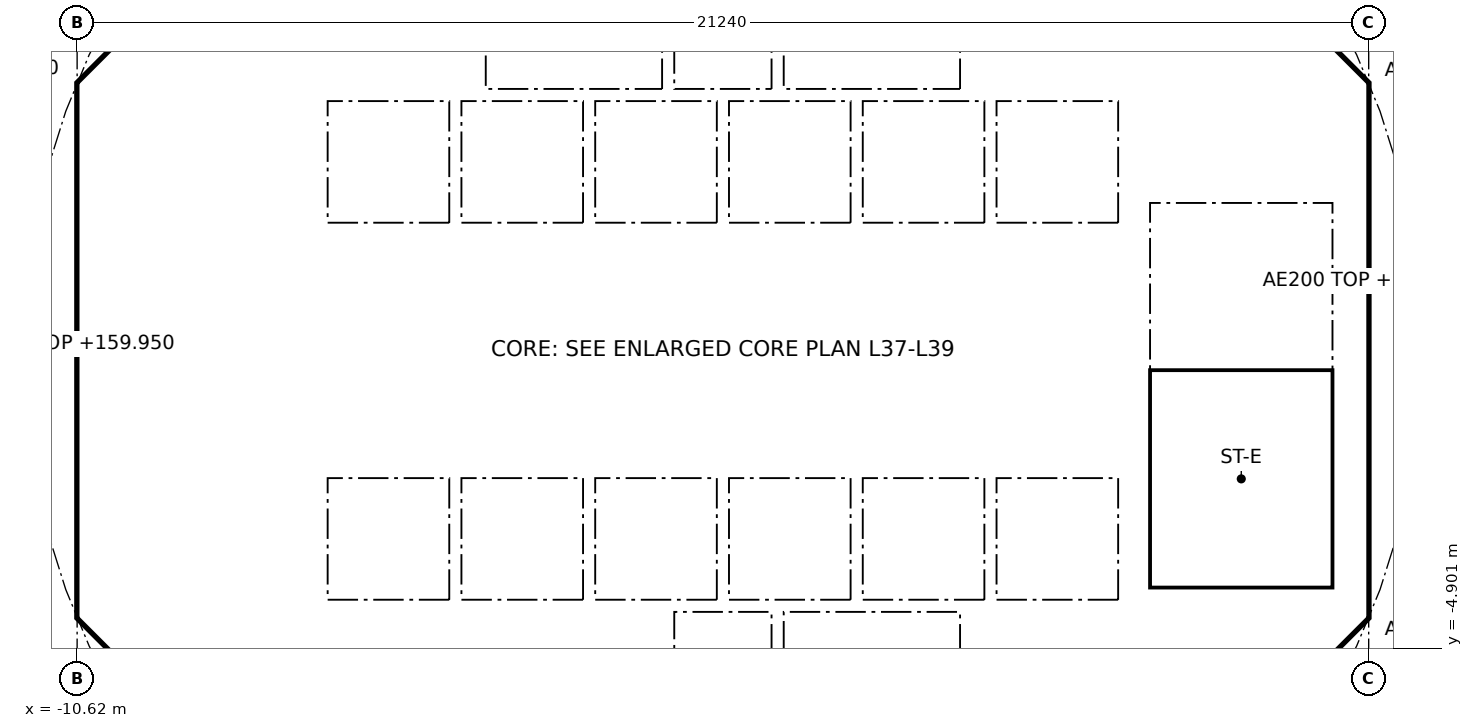
"""IFC4 building model, lengths in metres.
Left out: names, types, materials, properties, quantities, classifications, styles, units other than length and angle.
Written with IfcOpenShell. Run it as: python <this file> out.ifc"""

import sys

from ifc_helpers import new_model, si_unit, direction, frame, frame_2d, origin, place, context, subcontext, project, spatial, polyline, rectangle, outline, extrude, element, fill, save


model = new_model("IFC4")
c1 = context("Model", 3, precision=1e-05, world=origin(), true_north=direction((0.0, 1.0)))
c2 = subcontext(c1, "Body", "Model", "MODEL_VIEW")
j1 = project(units=[si_unit("LENGTHUNIT", "METRE"), si_unit("PLANEANGLEUNIT", "RADIAN")], contexts=[c1])
p1 = place(None, origin())
s1 = spatial("IfcSite", under=j1, at=p1, CompositionType="ELEMENT")
p2 = place(p1, origin())
s2 = spatial("IfcBuilding", under=s1, at=p2, CompositionType="ELEMENT")
p3 = place(p2, frame((0.0, 0.0, 156.6)))
s3 = spatial("IfcBuildingStorey", under=s2, at=p3, CompositionType="ELEMENT", Elevation=156.6)
p4 = place(p3, frame((9.988, 4.613, 0.0), z_axis=(0.0, 0.0, 1.0), x_axis=(-0.707106781187, 0.707106781187, 0.0)))
e1 = element("IfcWall", 1, at=p4, inside=s3, PredefinedType="SHEAR", context=c2, shape_type="SweptSolid", body=[
    extrude(rectangle(XDim=7.602, YDim=0.6, at=frame_2d((3.801, 0.0))), origin(), (0.0, 0.0, 1.0), 3.35),
])
p5 = place(p4, frame((3.201, 0.0, 0.0)))
e2 = element("IfcOpeningElement", 2, at=p5, cuts=e1, PredefinedType="OPENING", context=c2, shape_type="SweptSolid", body=[
    extrude(rectangle(XDim=1.2, YDim=2.1, at=frame_2d((0.6, 1.05))), frame((0.0, 0.31, 0.0), z_axis=(0.0, -1.0, 0.0), x_axis=(1.0, 0.0, 0.0)), (0.0, 0.0, 1.0), 0.62),
])
p6 = place(p3, frame((-4.613, 9.988, 0.0), z_axis=(0.0, 0.0, 1.0), x_axis=(-0.707106781187, -0.707106781187, 0.0)))
e3 = element("IfcWall", 3, at=p6, inside=s3, PredefinedType="SHEAR", context=c2, shape_type="SweptSolid", body=[
    extrude(rectangle(XDim=7.602, YDim=0.6, at=frame_2d((3.801, 0.0))), origin(), (0.0, 0.0, 1.0), 3.35),
])
p7 = place(p6, frame((0.351, 0.0, 0.0)))
e4 = element("IfcOpeningElement", 4, at=p7, cuts=e3, PredefinedType="OPENING", context=c2, shape_type="SweptSolid", body=[
    extrude(rectangle(XDim=1.1, YDim=2.1, at=frame_2d((0.55, 1.05))), frame((0.0, 0.31, 0.0), z_axis=(0.0, -1.0, 0.0), x_axis=(1.0, 0.0, 0.0)), (0.0, 0.0, 1.0), 0.62),
])
p8 = place(p3, frame((-10.325, 3.801, 0.0), z_axis=(0.0, 0.0, 1.0), x_axis=(0.0, -1.0, 0.0)))
e5 = element("IfcWall", 5, at=p8, inside=s3, PredefinedType="SHEAR", context=c2, shape_type="SweptSolid", body=[
    extrude(rectangle(XDim=7.602, YDim=0.6, at=frame_2d((3.801, 0.0))), origin(), (0.0, 0.0, 1.0), 3.35),
])
p9 = place(p8, frame((0.651, 0.0, 0.0)))
e6 = element("IfcOpeningElement", 6, at=p9, cuts=e5, PredefinedType="OPENING", context=c2, shape_type="SweptSolid", body=[
    extrude(rectangle(XDim=1.5, YDim=2.1, at=frame_2d((0.75, 1.05))), frame((0.0, 0.31, 0.0), z_axis=(0.0, -1.0, 0.0), x_axis=(1.0, 0.0, 0.0)), (0.0, 0.0, 1.0), 0.62),
])
p10 = place(p8, frame((5.451, 0.0, 0.0)))
e7 = element("IfcOpeningElement", 7, at=p10, cuts=e5, PredefinedType="OPENING", context=c2, shape_type="SweptSolid", body=[
    extrude(rectangle(XDim=1.5, YDim=2.1, at=frame_2d((0.75, 1.05))), frame((0.0, 0.31, 0.0), z_axis=(0.0, -1.0, 0.0), x_axis=(1.0, 0.0, 0.0)), (0.0, 0.0, 1.0), 0.62),
])
p11 = place(p3, frame((-9.988, -4.613, 0.0), z_axis=(0.0, 0.0, 1.0), x_axis=(0.707106781187, -0.707106781187, 0.0)))
e8 = element("IfcWall", 8, at=p11, inside=s3, PredefinedType="SHEAR", context=c2, shape_type="SweptSolid", body=[
    extrude(rectangle(XDim=7.602, YDim=0.6, at=frame_2d((3.801, 0.0))), origin(), (0.0, 0.0, 1.0), 3.35),
])
p12 = place(p11, frame((6.151, 0.0, 0.0)))
e9 = element("IfcOpeningElement", 9, at=p12, cuts=e8, PredefinedType="OPENING", context=c2, shape_type="SweptSolid", body=[
    extrude(rectangle(XDim=1.1, YDim=2.1, at=frame_2d((0.55, 1.05))), frame((0.0, 0.31, 0.0), z_axis=(0.0, -1.0, 0.0), x_axis=(1.0, 0.0, 0.0)), (0.0, 0.0, 1.0), 0.62),
])
p13 = place(p3, frame((4.613, -9.988, 0.0), z_axis=(0.0, 0.0, 1.0), x_axis=(0.707106781187, 0.707106781187, 0.0)))
e10 = element("IfcWall", 10, at=p13, inside=s3, PredefinedType="SHEAR", context=c2, shape_type="SweptSolid", body=[
    extrude(rectangle(XDim=7.602, YDim=0.6, at=frame_2d((3.801, 0.0))), origin(), (0.0, 0.0, 1.0), 3.35),
])
p14 = place(p13, frame((3.201, 0.0, 0.0)))
e11 = element("IfcOpeningElement", 11, at=p14, cuts=e10, PredefinedType="OPENING", context=c2, shape_type="SweptSolid", body=[
    extrude(rectangle(XDim=1.2, YDim=2.1, at=frame_2d((0.6, 1.05))), frame((0.0, 0.31, 0.0), z_axis=(0.0, -1.0, 0.0), x_axis=(1.0, 0.0, 0.0)), (0.0, 0.0, 1.0), 0.62),
])
p15 = place(p3, frame((-5.8, 4.3, 0.0), z_axis=(0.0, 0.0, 1.0), x_axis=(0.0, 1.0, 0.0)))
e12 = element("IfcWall", 12, at=p15, inside=s3, PredefinedType="PARTITIONING", context=c2, shape_type="SweptSolid", body=[
    extrude(rectangle(XDim=3.927, YDim=0.15, at=frame_2d((1.963, 0.0))), origin(), (0.0, 0.0, 1.0), 3.35),
])
p16 = place(p15, frame((1.551, 0.0, 0.0)))
e13 = element("IfcOpeningElement", 13, at=p16, cuts=e12, PredefinedType="OPENING", context=c2, shape_type="SweptSolid", body=[
    extrude(rectangle(XDim=0.9, YDim=2.1, at=frame_2d((0.45, 1.05))), frame((0.0, 0.085, 0.0), z_axis=(0.0, -1.0, 0.0), x_axis=(1.0, 0.0, 0.0)), (0.0, 0.0, 1.0), 0.17),
])
p17 = place(p3, frame((4.0, 4.3, 0.0), z_axis=(0.0, 0.0, 1.0), x_axis=(0.0, 1.0, 0.0)))
e14 = element("IfcWall", 14, at=p17, inside=s3, PredefinedType="SOLIDWALL", context=c2, shape_type="SweptSolid", body=[
    extrude(rectangle(XDim=2.2, YDim=0.2, at=frame_2d((1.1, 0.0))), origin(), (0.0, 0.0, 1.0), 3.35),
])
p18 = place(p17, frame((0.55, 0.0, 0.0)))
e15 = element("IfcOpeningElement", 15, at=p18, cuts=e14, PredefinedType="OPENING", context=c2, shape_type="SweptSolid", body=[
    extrude(rectangle(XDim=1.1, YDim=2.1, at=frame_2d((0.55, 1.05))), frame((0.0, 0.11, 0.0), z_axis=(0.0, -1.0, 0.0), x_axis=(1.0, 0.0, 0.0)), (0.0, 0.0, 1.0), 0.22),
])
p19 = place(p3, frame((-4.0, 4.3, 0.0), z_axis=(0.0, 0.0, 1.0), x_axis=(0.0, 1.0, 0.0)))
e16 = element("IfcWall", 16, at=p19, inside=s3, PredefinedType="SOLIDWALL", context=c2, shape_type="SweptSolid", body=[
    extrude(rectangle(XDim=2.2, YDim=0.2, at=frame_2d((1.1, 0.0))), origin(), (0.0, 0.0, 1.0), 3.35),
])
p20 = place(p19, frame((0.55, 0.0, 0.0)))
e17 = element("IfcOpeningElement", 17, at=p20, cuts=e16, PredefinedType="OPENING", context=c2, shape_type="SweptSolid", body=[
    extrude(rectangle(XDim=1.1, YDim=2.1, at=frame_2d((0.55, 1.05))), frame((0.0, 0.11, 0.0), z_axis=(0.0, -1.0, 0.0), x_axis=(1.0, 0.0, 0.0)), (0.0, 0.0, 1.0), 0.22),
])
p21 = place(p3, frame((-6.7, 2.0, 0.0), z_axis=(0.0, 0.0, 1.0), x_axis=(1.0, 0.0, 0.0)))
e18 = element("IfcWall", 18, at=p21, inside=s3, PredefinedType="SOLIDWALL", context=c2, shape_type="SweptSolid", body=[
    extrude(rectangle(XDim=13.4, YDim=0.2, at=frame_2d((6.7, 0.0))), origin(), (0.0, 0.0, 1.0), 3.35),
])
p22 = place(p21, frame((0.65, 0.0, 0.0)))
e19 = element("IfcOpeningElement", 19, at=p22, cuts=e18, PredefinedType="OPENING", context=c2, shape_type="SweptSolid", body=[
    extrude(rectangle(XDim=1.1, YDim=2.1, at=frame_2d((0.55, 1.05))), frame((0.0, 0.11, 0.0), z_axis=(0.0, -1.0, 0.0), x_axis=(1.0, 0.0, 0.0)), (0.0, 0.0, 1.0), 0.22),
])
p23 = place(p21, frame((2.85, 0.0, 0.0)))
e20 = element("IfcOpeningElement", 20, at=p23, cuts=e18, PredefinedType="OPENING", context=c2, shape_type="SweptSolid", body=[
    extrude(rectangle(XDim=1.1, YDim=2.1, at=frame_2d((0.55, 1.05))), frame((0.0, 0.11, 0.0), z_axis=(0.0, -1.0, 0.0), x_axis=(1.0, 0.0, 0.0)), (0.0, 0.0, 1.0), 0.22),
])
p24 = place(p21, frame((5.05, 0.0, 0.0)))
e21 = element("IfcOpeningElement", 21, at=p24, cuts=e18, PredefinedType="OPENING", context=c2, shape_type="SweptSolid", body=[
    extrude(rectangle(XDim=1.1, YDim=2.1, at=frame_2d((0.55, 1.05))), frame((0.0, 0.11, 0.0), z_axis=(0.0, -1.0, 0.0), x_axis=(1.0, 0.0, 0.0)), (0.0, 0.0, 1.0), 0.22),
])
p25 = place(p3, frame((6.7, 4.0, 0.0), z_axis=(0.0, 0.0, 1.0), x_axis=(1.0, 0.0, 0.0)))
e22 = element("IfcWall", 22, at=p25, inside=s3, PredefinedType="SOLIDWALL", context=c2, shape_type="SweptSolid", body=[
    extrude(rectangle(XDim=3.325, YDim=0.2, at=frame_2d((1.662, 0.0))), origin(), (0.0, 0.0, 1.0), 3.35),
])
p26 = place(p25, frame((1.25, 0.0, 0.0)))
e23 = element("IfcOpeningElement", 23, at=p26, cuts=e22, PredefinedType="OPENING", context=c2, shape_type="SweptSolid", body=[
    extrude(rectangle(XDim=1.1, YDim=2.1, at=frame_2d((0.55, 1.05))), frame((0.0, 0.11, 0.0), z_axis=(0.0, -1.0, 0.0), x_axis=(1.0, 0.0, 0.0)), (0.0, 0.0, 1.0), 0.22),
])
p27 = place(p3, frame((-7.4, -6.627, 0.0), z_axis=(0.0, 0.0, 1.0), x_axis=(0.0, 1.0, 0.0)))
e24 = element("IfcWall", 24, at=p27, inside=s3, PredefinedType="PARTITIONING", context=c2, shape_type="SweptSolid", body=[
    extrude(rectangle(XDim=2.527, YDim=0.15, at=frame_2d((1.263, 0.0))), origin(), (0.0, 0.0, 1.0), 3.35),
])
p28 = place(p27, frame((0.776, 0.0, 0.0)))
e25 = element("IfcOpeningElement", 25, at=p28, cuts=e24, PredefinedType="OPENING", context=c2, shape_type="SweptSolid", body=[
    extrude(rectangle(XDim=0.9, YDim=2.1, at=frame_2d((0.45, 1.05))), frame((0.0, 0.085, 0.0), z_axis=(0.0, -1.0, 0.0), x_axis=(1.0, 0.0, 0.0)), (0.0, 0.0, 1.0), 0.17),
])
p29 = place(p3, frame((4.0, -6.5, 0.0), z_axis=(0.0, 0.0, 1.0), x_axis=(0.0, 1.0, 0.0)))
e26 = element("IfcWall", 26, at=p29, inside=s3, PredefinedType="SOLIDWALL", context=c2, shape_type="SweptSolid", body=[
    extrude(rectangle(XDim=2.2, YDim=0.2, at=frame_2d((1.1, 0.0))), origin(), (0.0, 0.0, 1.0), 3.35),
])
p30 = place(p29, frame((0.55, 0.0, 0.0)))
e27 = element("IfcOpeningElement", 27, at=p30, cuts=e26, PredefinedType="OPENING", context=c2, shape_type="SweptSolid", body=[
    extrude(rectangle(XDim=1.1, YDim=2.1, at=frame_2d((0.55, 1.05))), frame((0.0, 0.11, 0.0), z_axis=(0.0, -1.0, 0.0), x_axis=(1.0, 0.0, 0.0)), (0.0, 0.0, 1.0), 0.22),
])
p31 = place(p3, frame((-4.0, -6.5, 0.0), z_axis=(0.0, 0.0, 1.0), x_axis=(0.0, 1.0, 0.0)))
e28 = element("IfcWall", 28, at=p31, inside=s3, PredefinedType="SOLIDWALL", context=c2, shape_type="SweptSolid", body=[
    extrude(rectangle(XDim=2.2, YDim=0.2, at=frame_2d((1.1, 0.0))), origin(), (0.0, 0.0, 1.0), 3.35),
])
p32 = place(p31, frame((0.65, 0.0, 0.0)))
e29 = element("IfcOpeningElement", 29, at=p32, cuts=e28, PredefinedType="OPENING", context=c2, shape_type="SweptSolid", body=[
    extrude(rectangle(XDim=0.9, YDim=2.1, at=frame_2d((0.45, 1.05))), frame((0.0, 0.11, 0.0), z_axis=(0.0, -1.0, 0.0), x_axis=(1.0, 0.0, 0.0)), (0.0, 0.0, 1.0), 0.22),
])
p33 = place(p3, frame((-6.7, -2.0, 0.0), z_axis=(0.0, 0.0, 1.0), x_axis=(1.0, 0.0, 0.0)))
e30 = element("IfcWall", 30, at=p33, inside=s3, PredefinedType="SOLIDWALL", context=c2, shape_type="SweptSolid", body=[
    extrude(rectangle(XDim=13.4, YDim=0.2, at=frame_2d((6.7, 0.0))), origin(), (0.0, 0.0, 1.0), 3.35),
])
p34 = place(p33, frame((0.65, 0.0, 0.0)))
e31 = element("IfcOpeningElement", 31, at=p34, cuts=e30, PredefinedType="OPENING", context=c2, shape_type="SweptSolid", body=[
    extrude(rectangle(XDim=1.1, YDim=2.1, at=frame_2d((0.55, 1.05))), frame((0.0, 0.11, 0.0), z_axis=(0.0, -1.0, 0.0), x_axis=(1.0, 0.0, 0.0)), (0.0, 0.0, 1.0), 0.22),
])
p35 = place(p33, frame((2.85, 0.0, 0.0)))
e32 = element("IfcOpeningElement", 32, at=p35, cuts=e30, PredefinedType="OPENING", context=c2, shape_type="SweptSolid", body=[
    extrude(rectangle(XDim=1.1, YDim=2.1, at=frame_2d((0.55, 1.05))), frame((0.0, 0.11, 0.0), z_axis=(0.0, -1.0, 0.0), x_axis=(1.0, 0.0, 0.0)), (0.0, 0.0, 1.0), 0.22),
])
p36 = place(p3, origin())
e33 = element("IfcWall", 33, at=p36, inside=s3, PredefinedType="SHEAR", context=c2, shape_type="SweptSolid", body=[
    extrude(outline(polyline([(-10.625, -3.801), (-10.025, -3.801), (-10.025, -4.152), (-9.776, -4.401), (-10.2, -4.825), (-10.625, -4.401), (-10.625, -3.801)])), origin(), (0.0, 0.0, 1.0), 3.35),
])
p37 = place(p3, origin())
e34 = element("IfcWall", 34, at=p37, inside=s3, PredefinedType="SHEAR", context=c2, shape_type="SweptSolid", body=[
    extrude(outline(polyline([(-10.2, 4.825), (-9.776, 4.401), (-10.025, 4.152), (-10.025, 3.801), (-10.625, 3.801), (-10.625, 4.401), (-10.2, 4.825)])), origin(), (0.0, 0.0, 1.0), 3.35),
])
p38 = place(p3, origin())
e35 = element("IfcWall", 35, at=p38, inside=s3, PredefinedType="SHEAR", context=c2, shape_type="SweptSolid", body=[
    extrude(outline(polyline([(9.776, -4.401), (10.025, -4.152), (10.025, -3.801), (10.025, 4.152), (9.776, 4.401), (10.2, 4.825), (10.625, 4.401), (10.625, -4.401), (10.2, -4.825), (9.776, -4.401)])), origin(), (0.0, 0.0, 1.0), 3.35),
])
for number, where, z_axis, x_axis in (
    (36, (-0.9, -6.5, 0.0), (0.0, 0.0, 1.0), (0.0, 1.0, 0.0)),
    (37, (0.9, -6.5, 0.0), (0.0, 0.0, 1.0), (0.0, 1.0, 0.0)),
):
    element("IfcWall", number, at=place(p3, frame(where, z_axis=z_axis, x_axis=x_axis)), inside=s3, PredefinedType="SOLIDWALL", context=c2, shape_type="SweptSolid", body=[
        extrude(rectangle(XDim=2.2, YDim=0.2, at=frame_2d((1.1, 0.0))), origin(), (0.0, 0.0, 1.0), 3.35),
    ])
p39 = place(p3, origin())
e38 = element("IfcWall", 38, at=p39, inside=s3, PredefinedType="SOLIDWALL", context=c2, shape_type="SweptSolid", body=[
    extrude(outline(polyline([(-6.7, -2.1), (-6.5, -2.1), (-6.5, -4.1), (-4.5, -4.1), (-4.5, -2.1), (-4.3, -2.1), (-4.3, -4.1), (-2.3, -4.1), (-2.3, -2.1), (-2.1, -2.1), (-2.1, -4.1), (-0.1, -4.1), (-0.1, -2.1), (0.1, -2.1), (0.1, -4.1), (2.1, -4.1), (2.1, -2.1), (2.3, -2.1), (2.3, -4.1), (4.3, -4.1), (4.3, -2.1), (4.5, -2.1), (4.5, -4.1), (6.5, -4.1), (6.5, -2.1), (6.7, -2.1), (6.7, -4.3), (-6.7, -4.3), (-6.7, -2.1)])), origin(), (0.0, 0.0, 1.0), 3.35),
])
for number, where, z_axis, x_axis in (
    (39, (-0.9, 4.3, 0.0), (0.0, 0.0, 1.0), (0.0, 1.0, 0.0)),
    (40, (0.9, 4.3, 0.0), (0.0, 0.0, 1.0), (0.0, 1.0, 0.0)),
):
    element("IfcWall", number, at=place(p3, frame(where, z_axis=z_axis, x_axis=x_axis)), inside=s3, PredefinedType="SOLIDWALL", context=c2, shape_type="SweptSolid", body=[
        extrude(rectangle(XDim=2.2, YDim=0.2, at=frame_2d((1.1, 0.0))), origin(), (0.0, 0.0, 1.0), 3.35),
    ])
p40 = place(p3, origin())
e41 = element("IfcWall", 41, at=p40, inside=s3, PredefinedType="SOLIDWALL", context=c2, shape_type="SweptSolid", body=[
    extrude(outline(polyline([(-6.5, 2.1), (-6.7, 2.1), (-6.7, 4.3), (6.7, 4.3), (6.7, 2.1), (6.5, 2.1), (6.5, 4.1), (4.5, 4.1), (4.5, 2.1), (4.3, 2.1), (4.3, 4.1), (2.3, 4.1), (2.3, 2.1), (2.1, 2.1), (2.1, 4.1), (0.1, 4.1), (0.1, 2.1), (-0.1, 2.1), (-0.1, 4.1), (-2.1, 4.1), (-2.1, 2.1), (-2.3, 2.1), (-2.3, 4.1), (-4.3, 4.1), (-4.3, 2.1), (-4.5, 2.1), (-4.5, 4.1), (-6.5, 4.1), (-6.5, 2.1)])), origin(), (0.0, 0.0, 1.0), 3.35),
])
for number, where, z_axis, x_axis in (
    (42, (-10.025, -4.0, 0.0), (0.0, 0.0, 1.0), (1.0, 0.0, 0.0)),
    (43, (-10.025, 4.0, 0.0), (0.0, 0.0, 1.0), (1.0, 0.0, 0.0)),
):
    element("IfcWall", number, at=place(p3, frame(where, z_axis=z_axis, x_axis=x_axis)), inside=s3, PredefinedType="PARTITIONING", context=c2, shape_type="SweptSolid", body=[
        extrude(rectangle(XDim=3.325, YDim=0.2, at=frame_2d((1.662, 0.0))), origin(), (0.0, 0.0, 1.0), 3.35),
    ])
p41 = place(p3, origin())
e44 = element("IfcWall", 44, at=p41, inside=s3, PredefinedType="SOLIDWALL", context=c2, shape_type="SweptSolid", body=[
    extrude(outline(polyline([(7.025, -3.9), (6.7, -3.9), (6.7, 3.9), (7.025, 3.9), (7.025, -3.9)])), origin(), (0.0, 0.0, 1.0), 3.35),
])
p42 = place(p3, origin())
e45 = element("IfcWall", 45, at=p42, inside=s3, PredefinedType="SOLIDWALL", context=c2, shape_type="SweptSolid", body=[
    extrude(outline(polyline([(10.025, -4.1), (6.7, -4.1), (6.7, -3.9), (10.025, -3.9), (10.025, -4.1)])), origin(), (0.0, 0.0, 1.0), 3.35),
])
p43 = place(p22, origin())
e46 = element("IfcDoor", 46, at=p43, inside=s3, OperationType="DOUBLE_DOOR_SLIDING", PredefinedType="DOOR", context=c2, shape_type="SweptSolid", body=[
    extrude(rectangle(XDim=1.1, YDim=2.1, at=frame_2d((0.55, 1.05))), frame((0.0, 0.025, 0.0), z_axis=(0.0, -1.0, 0.0), x_axis=(1.0, 0.0, 0.0)), (0.0, 0.0, 1.0), 0.05),
])
fill(e19, e46)
p44 = place(p23, origin())
e47 = element("IfcDoor", 47, at=p44, inside=s3, OperationType="DOUBLE_DOOR_SLIDING", PredefinedType="DOOR", context=c2, shape_type="SweptSolid", body=[
    extrude(rectangle(XDim=1.1, YDim=2.1, at=frame_2d((0.55, 1.05))), frame((0.0, 0.025, 0.0), z_axis=(0.0, -1.0, 0.0), x_axis=(1.0, 0.0, 0.0)), (0.0, 0.0, 1.0), 0.05),
])
fill(e20, e47)
p45 = place(p24, origin())
e48 = element("IfcDoor", 48, at=p45, inside=s3, OperationType="DOUBLE_DOOR_SLIDING", PredefinedType="DOOR", context=c2, shape_type="SweptSolid", body=[
    extrude(rectangle(XDim=1.1, YDim=2.1, at=frame_2d((0.55, 1.05))), frame((0.0, 0.025, 0.0), z_axis=(0.0, -1.0, 0.0), x_axis=(1.0, 0.0, 0.0)), (0.0, 0.0, 1.0), 0.05),
])
fill(e21, e48)
p46 = place(p34, origin())
e49 = element("IfcDoor", 49, at=p46, inside=s3, OperationType="DOUBLE_DOOR_SLIDING", PredefinedType="DOOR", context=c2, shape_type="SweptSolid", body=[
    extrude(rectangle(XDim=1.1, YDim=2.1, at=frame_2d((0.55, 1.05))), frame((0.0, 0.025, 0.0), z_axis=(0.0, -1.0, 0.0), x_axis=(1.0, 0.0, 0.0)), (0.0, 0.0, 1.0), 0.05),
])
fill(e31, e49)
p47 = place(p35, origin())
e50 = element("IfcDoor", 50, at=p47, inside=s3, OperationType="DOUBLE_DOOR_SLIDING", PredefinedType="DOOR", context=c2, shape_type="SweptSolid", body=[
    extrude(rectangle(XDim=1.1, YDim=2.1, at=frame_2d((0.55, 1.05))), frame((0.0, 0.025, 0.0), z_axis=(0.0, -1.0, 0.0), x_axis=(1.0, 0.0, 0.0)), (0.0, 0.0, 1.0), 0.05),
])
fill(e32, e50)
p48 = place(p18, origin())
e51 = element("IfcDoor", 51, at=p48, inside=s3, OperationType="DOUBLE_DOOR_SLIDING", PredefinedType="DOOR", context=c2, shape_type="SweptSolid", body=[
    extrude(rectangle(XDim=1.1, YDim=2.1, at=frame_2d((0.55, 1.05))), frame((0.0, 0.025, 0.0), z_axis=(0.0, -1.0, 0.0), x_axis=(1.0, 0.0, 0.0)), (0.0, 0.0, 1.0), 0.05),
])
fill(e15, e51)
p49 = place(p30, origin())
e52 = element("IfcDoor", 52, at=p49, inside=s3, OperationType="DOUBLE_DOOR_SLIDING", PredefinedType="DOOR", context=c2, shape_type="SweptSolid", body=[
    extrude(rectangle(XDim=1.1, YDim=2.1, at=frame_2d((0.55, 1.05))), frame((0.0, 0.025, 0.0), z_axis=(0.0, -1.0, 0.0), x_axis=(1.0, 0.0, 0.0)), (0.0, 0.0, 1.0), 0.05),
])
fill(e27, e52)
p50 = place(p20, origin())
e53 = element("IfcDoor", 53, at=p50, inside=s3, OperationType="DOUBLE_DOOR_SLIDING", PredefinedType="DOOR", context=c2, shape_type="SweptSolid", body=[
    extrude(rectangle(XDim=1.1, YDim=2.1, at=frame_2d((0.55, 1.05))), frame((0.0, 0.025, 0.0), z_axis=(0.0, -1.0, 0.0), x_axis=(1.0, 0.0, 0.0)), (0.0, 0.0, 1.0), 0.05),
])
fill(e17, e53)
p51 = place(p26, frame((1.1, 0.0, 0.0), x_axis=(-1.0, 0.0, 0.0)))
e54 = element("IfcDoor", 54, at=p51, inside=s3, OperationType="SINGLE_SWING_LEFT", PredefinedType="DOOR", context=c2, shape_type="SweptSolid", body=[
    extrude(rectangle(XDim=1.1, YDim=2.1, at=frame_2d((0.55, 1.05))), frame((0.0, 0.025, 0.0), z_axis=(0.0, -1.0, 0.0), x_axis=(1.0, 0.0, 0.0)), (0.0, 0.0, 1.0), 0.05),
])
fill(e23, e54)
p52 = place(p9, origin())
e55 = element("IfcDoor", 55, at=p52, inside=s3, OperationType="DOUBLE_DOOR_SINGLE_SWING", PredefinedType="DOOR", context=c2, shape_type="SweptSolid", body=[
    extrude(rectangle(XDim=1.5, YDim=2.1, at=frame_2d((0.75, 1.05))), frame((0.0, 0.025, 0.0), z_axis=(0.0, -1.0, 0.0), x_axis=(1.0, 0.0, 0.0)), (0.0, 0.0, 1.0), 0.05),
])
fill(e6, e55)
p53 = place(p10, origin())
e56 = element("IfcDoor", 56, at=p53, inside=s3, OperationType="DOUBLE_DOOR_SINGLE_SWING", PredefinedType="DOOR", context=c2, shape_type="SweptSolid", body=[
    extrude(rectangle(XDim=1.5, YDim=2.1, at=frame_2d((0.75, 1.05))), frame((0.0, 0.025, 0.0), z_axis=(0.0, -1.0, 0.0), x_axis=(1.0, 0.0, 0.0)), (0.0, 0.0, 1.0), 0.05),
])
fill(e7, e56)
save(model, sys.argv[1])
